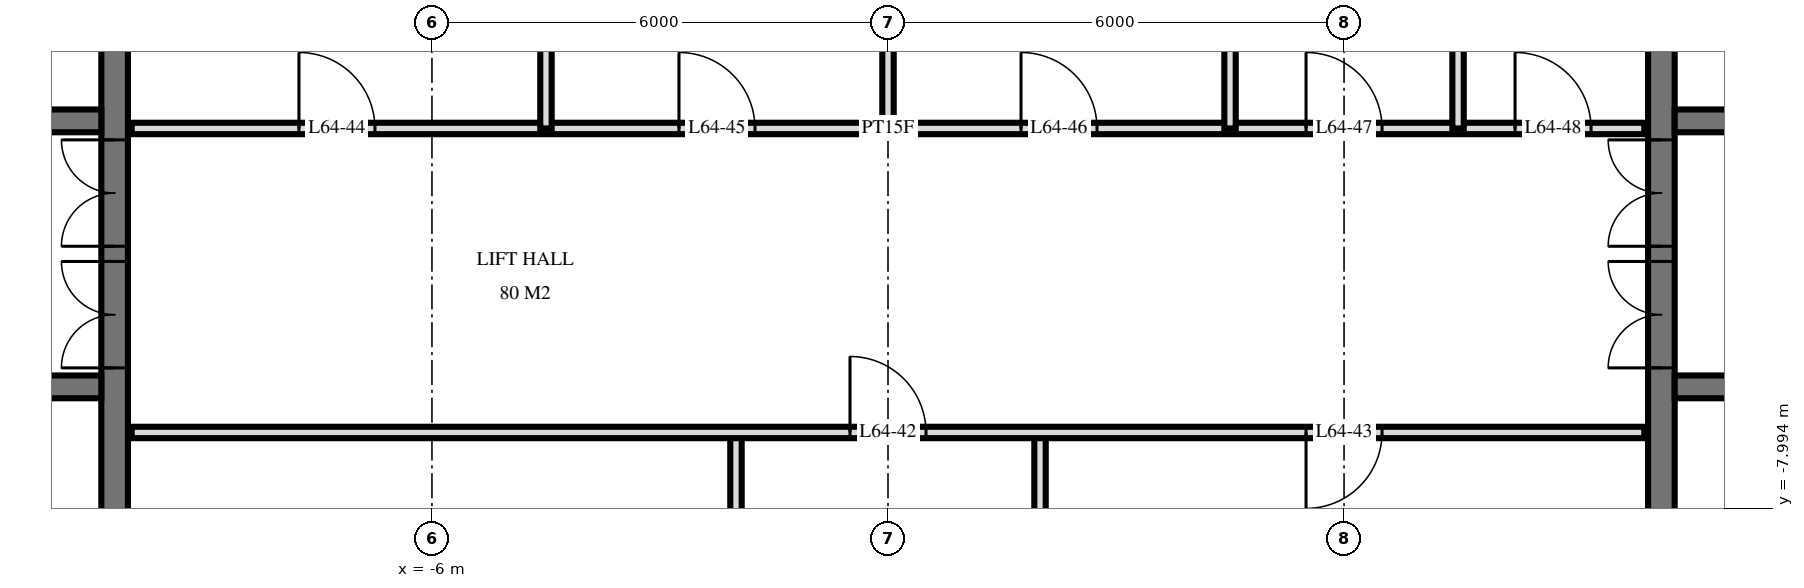
"""IFC4 building model, lengths in metres.
Left out: names, types, materials, properties, quantities, classifications, styles, units other than length and angle.
Written with IfcOpenShell. Run it as: python <this file> out.ifc"""

import sys

from ifc_helpers import new_model, si_unit, direction, frame, frame_2d, origin, place, context, subcontext, project, spatial, rectangle, extrude, element, fill, save


model = new_model("IFC4")
c1 = context("Model", 3, precision=1e-05, world=origin(), true_north=direction((0.0, 1.0)))
c2 = subcontext(c1, "Body", "Model", "MODEL_VIEW")
j1 = project(units=[si_unit("LENGTHUNIT", "METRE"), si_unit("PLANEANGLEUNIT", "RADIAN")], contexts=[c1])
p1 = place(None, origin())
s1 = spatial("IfcSite", under=j1, at=p1, CompositionType="ELEMENT")
p2 = place(p1, origin())
s2 = spatial("IfcBuilding", under=s1, at=p2, CompositionType="ELEMENT")
p3 = place(p2, frame((0.0, 0.0, 243.1)))
s3 = spatial("IfcBuildingStorey", under=s2, at=p3, CompositionType="ELEMENT", Elevation=243.1)
p4 = place(p3, frame((-10.175, -14.55, 0.0), z_axis=(0.0, 0.0, 1.0), x_axis=(0.0, 1.0, 0.0)))
e1 = element("IfcWall", 1, at=p4, inside=s3, PredefinedType="SHEAR", context=c2, shape_type="SweptSolid", body=[
    extrude(rectangle(XDim=14.1, YDim=0.35, at=frame_2d((7.05, 0.0))), origin(), (0.0, 0.0, 1.0), 3.5),
])
p5 = place(p4, frame((8.4, 0.0, 0.0)))
e2 = element("IfcOpeningElement", 2, at=p5, cuts=e1, PredefinedType="OPENING", context=c2, shape_type="SweptSolid", body=[
    extrude(rectangle(XDim=1.4, YDim=2.4, at=frame_2d((0.7, 1.2))), frame((0.0, 0.185, 0.0), z_axis=(0.0, -1.0, 0.0), x_axis=(1.0, 0.0, 0.0)), (0.0, 0.0, 1.0), 0.37),
])
p6 = place(p4, frame((10.0, 0.0, 0.0)))
e3 = element("IfcOpeningElement", 3, at=p6, cuts=e1, PredefinedType="OPENING", context=c2, shape_type="SweptSolid", body=[
    extrude(rectangle(XDim=1.4, YDim=2.4, at=frame_2d((0.7, 1.2))), frame((0.0, 0.185, 0.0), z_axis=(0.0, -1.0, 0.0), x_axis=(1.0, 0.0, 0.0)), (0.0, 0.0, 1.0), 0.37),
])
p7 = place(p4, frame((4.0, 0.0, 0.0)))
e4 = element("IfcOpeningElement", 4, at=p7, cuts=e1, PredefinedType="OPENING", context=c2, shape_type="SweptSolid", body=[
    extrude(rectangle(XDim=1.2, YDim=2.1, at=frame_2d((0.6, 1.05))), frame((0.0, 0.185, 0.0), z_axis=(0.0, -1.0, 0.0), x_axis=(1.0, 0.0, 0.0)), (0.0, 0.0, 1.0), 0.37),
])
p8 = place(p3, frame((-24.05, -2.9, 0.0), z_axis=(0.0, 0.0, 1.0), x_axis=(1.0, 0.0, 0.0)))
e5 = element("IfcWall", 5, at=p8, inside=s3, PredefinedType="SHEAR", context=c2, shape_type="SweptSolid", body=[
    extrude(rectangle(XDim=13.7, YDim=0.3, at=frame_2d((6.85, 0.0))), origin(), (0.0, 0.0, 1.0), 3.5),
])
p9 = place(p8, frame((0.55, 0.0, 0.0)))
e6 = element("IfcOpeningElement", 6, at=p9, cuts=e5, PredefinedType="OPENING", context=c2, shape_type="SweptSolid", body=[
    extrude(rectangle(XDim=1.1, YDim=2.1, at=frame_2d((0.55, 1.05))), frame((0.0, 0.16, 0.0), z_axis=(0.0, -1.0, 0.0), x_axis=(1.0, 0.0, 0.0)), (0.0, 0.0, 1.0), 0.32),
])
p10 = place(p8, frame((6.613, 0.0, 0.0)))
e7 = element("IfcOpeningElement", 7, at=p10, cuts=e5, PredefinedType="OPENING", context=c2, shape_type="SweptSolid", body=[
    extrude(rectangle(XDim=0.9, YDim=2.1, at=frame_2d((0.45, 1.05))), frame((0.0, 0.16, 0.0), z_axis=(0.0, -1.0, 0.0), x_axis=(1.0, 0.0, 0.0)), (0.0, 0.0, 1.0), 0.32),
])
p11 = place(p8, frame((5.188, 0.0, 0.0)))
e8 = element("IfcOpeningElement", 8, at=p11, cuts=e5, PredefinedType="OPENING", context=c2, shape_type="SweptSolid", body=[
    extrude(rectangle(XDim=0.9, YDim=2.1, at=frame_2d((0.45, 1.05))), frame((0.0, 0.16, 0.0), z_axis=(0.0, -1.0, 0.0), x_axis=(1.0, 0.0, 0.0)), (0.0, 0.0, 1.0), 0.32),
])
p12 = place(p8, frame((3.0, 0.0, 0.0)))
e9 = element("IfcOpeningElement", 9, at=p12, cuts=e5, PredefinedType="OPENING", context=c2, shape_type="SweptSolid", body=[
    extrude(rectangle(XDim=1.0, YDim=2.1, at=frame_2d((0.5, 1.05))), frame((0.0, 0.16, 0.0), z_axis=(0.0, -1.0, 0.0), x_axis=(1.0, 0.0, 0.0)), (0.0, 0.0, 1.0), 0.32),
])
p13 = place(p3, frame((-24.05, -6.4, 0.0), z_axis=(0.0, 0.0, 1.0), x_axis=(1.0, 0.0, 0.0)))
e10 = element("IfcWall", 10, at=p13, inside=s3, PredefinedType="SHEAR", context=c2, shape_type="SweptSolid", body=[
    extrude(rectangle(XDim=13.7, YDim=0.3, at=frame_2d((6.85, 0.0))), origin(), (0.0, 0.0, 1.0), 3.5),
])
p14 = place(p13, frame((0.55, 0.0, 0.0)))
e11 = element("IfcOpeningElement", 11, at=p14, cuts=e10, PredefinedType="OPENING", context=c2, shape_type="SweptSolid", body=[
    extrude(rectangle(XDim=1.1, YDim=2.1, at=frame_2d((0.55, 1.05))), frame((0.0, 0.16, 0.0), z_axis=(0.0, -1.0, 0.0), x_axis=(1.0, 0.0, 0.0)), (0.0, 0.0, 1.0), 0.32),
])
p15 = place(p13, frame((5.8, 0.0, 0.0)))
e12 = element("IfcOpeningElement", 12, at=p15, cuts=e10, PredefinedType="OPENING", context=c2, shape_type="SweptSolid", body=[
    extrude(rectangle(XDim=1.1, YDim=2.1, at=frame_2d((0.55, 1.05))), frame((0.0, 0.16, 0.0), z_axis=(0.0, -1.0, 0.0), x_axis=(1.0, 0.0, 0.0)), (0.0, 0.0, 1.0), 0.32),
])
p16 = place(p3, frame((10.175, -14.55, 0.0), z_axis=(0.0, 0.0, 1.0), x_axis=(0.0, 1.0, 0.0)))
e13 = element("IfcWall", 13, at=p16, inside=s3, PredefinedType="SHEAR", context=c2, shape_type="SweptSolid", body=[
    extrude(rectangle(XDim=14.1, YDim=0.35, at=frame_2d((7.05, 0.0))), origin(), (0.0, 0.0, 1.0), 3.5),
])
p17 = place(p16, frame((8.4, 0.0, 0.0)))
e14 = element("IfcOpeningElement", 14, at=p17, cuts=e13, PredefinedType="OPENING", context=c2, shape_type="SweptSolid", body=[
    extrude(rectangle(XDim=1.4, YDim=2.4, at=frame_2d((0.7, 1.2))), frame((0.0, 0.185, 0.0), z_axis=(0.0, -1.0, 0.0), x_axis=(1.0, 0.0, 0.0)), (0.0, 0.0, 1.0), 0.37),
])
p18 = place(p16, frame((10.0, 0.0, 0.0)))
e15 = element("IfcOpeningElement", 15, at=p18, cuts=e13, PredefinedType="OPENING", context=c2, shape_type="SweptSolid", body=[
    extrude(rectangle(XDim=1.4, YDim=2.4, at=frame_2d((0.7, 1.2))), frame((0.0, 0.185, 0.0), z_axis=(0.0, -1.0, 0.0), x_axis=(1.0, 0.0, 0.0)), (0.0, 0.0, 1.0), 0.37),
])
p19 = place(p16, frame((4.0, 0.0, 0.0)))
e16 = element("IfcOpeningElement", 16, at=p19, cuts=e13, PredefinedType="OPENING", context=c2, shape_type="SweptSolid", body=[
    extrude(rectangle(XDim=1.2, YDim=2.1, at=frame_2d((0.6, 1.05))), frame((0.0, 0.185, 0.0), z_axis=(0.0, -1.0, 0.0), x_axis=(1.0, 0.0, 0.0)), (0.0, 0.0, 1.0), 0.37),
])
p20 = place(p3, frame((10.35, -2.9, 0.0), z_axis=(0.0, 0.0, 1.0), x_axis=(1.0, 0.0, 0.0)))
e17 = element("IfcWall", 17, at=p20, inside=s3, PredefinedType="SHEAR", context=c2, shape_type="SweptSolid", body=[
    extrude(rectangle(XDim=13.7, YDim=0.3, at=frame_2d((6.85, 0.0))), origin(), (0.0, 0.0, 1.0), 3.5),
])
p21 = place(p20, frame((12.05, 0.0, 0.0)))
e18 = element("IfcOpeningElement", 18, at=p21, cuts=e17, PredefinedType="OPENING", context=c2, shape_type="SweptSolid", body=[
    extrude(rectangle(XDim=1.1, YDim=2.1, at=frame_2d((0.55, 1.05))), frame((0.0, 0.16, 0.0), z_axis=(0.0, -1.0, 0.0), x_axis=(1.0, 0.0, 0.0)), (0.0, 0.0, 1.0), 0.32),
])
p22 = place(p20, frame((6.188, 0.0, 0.0)))
e19 = element("IfcOpeningElement", 19, at=p22, cuts=e17, PredefinedType="OPENING", context=c2, shape_type="SweptSolid", body=[
    extrude(rectangle(XDim=0.9, YDim=2.1, at=frame_2d((0.45, 1.05))), frame((0.0, 0.16, 0.0), z_axis=(0.0, -1.0, 0.0), x_axis=(1.0, 0.0, 0.0)), (0.0, 0.0, 1.0), 0.32),
])
p23 = place(p20, frame((7.613, 0.0, 0.0)))
e20 = element("IfcOpeningElement", 20, at=p23, cuts=e17, PredefinedType="OPENING", context=c2, shape_type="SweptSolid", body=[
    extrude(rectangle(XDim=0.9, YDim=2.1, at=frame_2d((0.45, 1.05))), frame((0.0, 0.16, 0.0), z_axis=(0.0, -1.0, 0.0), x_axis=(1.0, 0.0, 0.0)), (0.0, 0.0, 1.0), 0.32),
])
p24 = place(p20, frame((9.7, 0.0, 0.0)))
e21 = element("IfcOpeningElement", 21, at=p24, cuts=e17, PredefinedType="OPENING", context=c2, shape_type="SweptSolid", body=[
    extrude(rectangle(XDim=1.0, YDim=2.1, at=frame_2d((0.5, 1.05))), frame((0.0, 0.16, 0.0), z_axis=(0.0, -1.0, 0.0), x_axis=(1.0, 0.0, 0.0)), (0.0, 0.0, 1.0), 0.32),
])
p25 = place(p3, frame((10.35, -6.4, 0.0), z_axis=(0.0, 0.0, 1.0), x_axis=(1.0, 0.0, 0.0)))
e22 = element("IfcWall", 22, at=p25, inside=s3, PredefinedType="SHEAR", context=c2, shape_type="SweptSolid", body=[
    extrude(rectangle(XDim=13.7, YDim=0.3, at=frame_2d((6.85, 0.0))), origin(), (0.0, 0.0, 1.0), 3.5),
])
p26 = place(p25, frame((12.05, 0.0, 0.0)))
e23 = element("IfcOpeningElement", 23, at=p26, cuts=e22, PredefinedType="OPENING", context=c2, shape_type="SweptSolid", body=[
    extrude(rectangle(XDim=1.1, YDim=2.1, at=frame_2d((0.55, 1.05))), frame((0.0, 0.16, 0.0), z_axis=(0.0, -1.0, 0.0), x_axis=(1.0, 0.0, 0.0)), (0.0, 0.0, 1.0), 0.32),
])
p27 = place(p25, frame((6.8, 0.0, 0.0)))
e24 = element("IfcOpeningElement", 24, at=p27, cuts=e22, PredefinedType="OPENING", context=c2, shape_type="SweptSolid", body=[
    extrude(rectangle(XDim=1.1, YDim=2.1, at=frame_2d((0.55, 1.05))), frame((0.0, 0.16, 0.0), z_axis=(0.0, -1.0, 0.0), x_axis=(1.0, 0.0, 0.0)), (0.0, 0.0, 1.0), 0.32),
])
for number, where, z_axis, x_axis in (
    (25, (7.5, -3.0, 0.0), (0.0, 0.0, 1.0), (0.0, 1.0, 0.0)),
    (26, (4.5, -3.0, 0.0), (0.0, 0.0, 1.0), (0.0, 1.0, 0.0)),
):
    element("IfcWall", number, at=place(p3, frame(where, z_axis=z_axis, x_axis=x_axis)), inside=s3, PredefinedType="PLUMBINGWALL", context=c2, shape_type="SweptSolid", body=[
        extrude(rectangle(XDim=4.02, YDim=0.15, at=frame_2d((2.01, 0.0))), origin(), (0.0, 0.0, 1.0), 3.22),
    ])
p28 = place(p3, frame((2.0, -11.0, 0.0), z_axis=(0.0, 0.0, 1.0), x_axis=(0.0, 1.0, 0.0)))
e27 = element("IfcWall", 27, at=p28, inside=s3, PredefinedType="PARTITIONING", context=c2, shape_type="SweptSolid", body=[
    extrude(rectangle(XDim=4.0, YDim=0.15, at=frame_2d((2.0, 0.0))), origin(), (0.0, 0.0, 1.0), 3.22),
])
p29 = place(p3, frame((0.0, -3.0, 0.0), z_axis=(0.0, 0.0, 1.0), x_axis=(0.0, 1.0, 0.0)))
e28 = element("IfcWall", 28, at=p29, inside=s3, PredefinedType="PARTITIONING", context=c2, shape_type="SweptSolid", body=[
    extrude(rectangle(XDim=4.02, YDim=0.15, at=frame_2d((2.01, 0.0))), origin(), (0.0, 0.0, 1.0), 3.22),
])
p30 = place(p3, frame((-2.0, -11.0, 0.0), z_axis=(0.0, 0.0, 1.0), x_axis=(0.0, 1.0, 0.0)))
e29 = element("IfcWall", 29, at=p30, inside=s3, PredefinedType="PARTITIONING", context=c2, shape_type="SweptSolid", body=[
    extrude(rectangle(XDim=4.0, YDim=0.15, at=frame_2d((2.0, 0.0))), origin(), (0.0, 0.0, 1.0), 3.22),
])
p31 = place(p3, frame((-4.5, -3.0, 0.0), z_axis=(0.0, 0.0, 1.0), x_axis=(0.0, 1.0, 0.0)))
e30 = element("IfcWall", 30, at=p31, inside=s3, PredefinedType="PARTITIONING", context=c2, shape_type="SweptSolid", body=[
    extrude(rectangle(XDim=4.02, YDim=0.15, at=frame_2d((2.01, 0.0))), origin(), (0.0, 0.0, 1.0), 3.22),
])
p32 = place(p3, frame((-9.95, -7.0, 0.0), z_axis=(0.0, 0.0, 1.0), x_axis=(1.0, 0.0, 0.0)))
e31 = element("IfcWall", 31, at=p32, inside=s3, PredefinedType="PARTITIONING", context=c2, shape_type="SweptSolid", body=[
    extrude(rectangle(XDim=19.9, YDim=0.15, at=frame_2d((9.95, 0.0))), origin(), (0.0, 0.0, 1.0), 3.22),
])
p33 = place(p32, frame((9.45, 0.0, 0.0)))
e32 = element("IfcOpeningElement", 32, at=p33, cuts=e31, PredefinedType="OPENING", context=c2, shape_type="SweptSolid", body=[
    extrude(rectangle(XDim=1.0, YDim=2.1, at=frame_2d((0.5, 1.05))), frame((0.0, 0.085, 0.0), z_axis=(0.0, -1.0, 0.0), x_axis=(1.0, 0.0, 0.0)), (0.0, 0.0, 1.0), 0.17),
])
p34 = place(p32, frame((15.45, 0.0, 0.0)))
e33 = element("IfcOpeningElement", 33, at=p34, cuts=e31, PredefinedType="OPENING", context=c2, shape_type="SweptSolid", body=[
    extrude(rectangle(XDim=1.0, YDim=2.1, at=frame_2d((0.5, 1.05))), frame((0.0, 0.085, 0.0), z_axis=(0.0, -1.0, 0.0), x_axis=(1.0, 0.0, 0.0)), (0.0, 0.0, 1.0), 0.17),
])
p35 = place(p3, frame((-9.95, -3.0, 0.0), z_axis=(0.0, 0.0, 1.0), x_axis=(1.0, 0.0, 0.0)))
e34 = element("IfcWall", 34, at=p35, inside=s3, PredefinedType="PARTITIONING", context=c2, shape_type="SweptSolid", body=[
    extrude(rectangle(XDim=19.9, YDim=0.15, at=frame_2d((9.95, 0.0))), origin(), (0.0, 0.0, 1.0), 3.22),
])
p36 = place(p35, frame((2.2, 0.0, 0.0)))
e35 = element("IfcOpeningElement", 35, at=p36, cuts=e34, PredefinedType="OPENING", context=c2, shape_type="SweptSolid", body=[
    extrude(rectangle(XDim=1.0, YDim=2.1, at=frame_2d((0.5, 1.05))), frame((0.0, 0.085, 0.0), z_axis=(0.0, -1.0, 0.0), x_axis=(1.0, 0.0, 0.0)), (0.0, 0.0, 1.0), 0.17),
])
p37 = place(p35, frame((7.2, 0.0, 0.0)))
e36 = element("IfcOpeningElement", 36, at=p37, cuts=e34, PredefinedType="OPENING", context=c2, shape_type="SweptSolid", body=[
    extrude(rectangle(XDim=1.0, YDim=2.1, at=frame_2d((0.5, 1.05))), frame((0.0, 0.085, 0.0), z_axis=(0.0, -1.0, 0.0), x_axis=(1.0, 0.0, 0.0)), (0.0, 0.0, 1.0), 0.17),
])
p38 = place(p35, frame((11.7, 0.0, 0.0)))
e37 = element("IfcOpeningElement", 37, at=p38, cuts=e34, PredefinedType="OPENING", context=c2, shape_type="SweptSolid", body=[
    extrude(rectangle(XDim=1.0, YDim=2.1, at=frame_2d((0.5, 1.05))), frame((0.0, 0.085, 0.0), z_axis=(0.0, -1.0, 0.0), x_axis=(1.0, 0.0, 0.0)), (0.0, 0.0, 1.0), 0.17),
])
p39 = place(p35, frame((15.45, 0.0, 0.0)))
e38 = element("IfcOpeningElement", 38, at=p39, cuts=e34, PredefinedType="OPENING", context=c2, shape_type="SweptSolid", body=[
    extrude(rectangle(XDim=1.0, YDim=2.1, at=frame_2d((0.5, 1.05))), frame((0.0, 0.085, 0.0), z_axis=(0.0, -1.0, 0.0), x_axis=(1.0, 0.0, 0.0)), (0.0, 0.0, 1.0), 0.17),
])
p40 = place(p35, frame((18.2, 0.0, 0.0)))
e39 = element("IfcOpeningElement", 39, at=p40, cuts=e34, PredefinedType="OPENING", context=c2, shape_type="SweptSolid", body=[
    extrude(rectangle(XDim=1.0, YDim=2.1, at=frame_2d((0.5, 1.05))), frame((0.0, 0.085, 0.0), z_axis=(0.0, -1.0, 0.0), x_axis=(1.0, 0.0, 0.0)), (0.0, 0.0, 1.0), 0.17),
])
p41 = place(p5, origin())
e40 = element("IfcDoor", 40, at=p41, inside=s3, OperationType="DOUBLE_DOOR_SINGLE_SWING", PredefinedType="DOOR", context=c2, shape_type="SweptSolid", body=[
    extrude(rectangle(XDim=1.4, YDim=2.4, at=frame_2d((0.7, 1.2))), frame((0.0, 0.025, 0.0), z_axis=(0.0, -1.0, 0.0), x_axis=(1.0, 0.0, 0.0)), (0.0, 0.0, 1.0), 0.05),
])
fill(e2, e40)
p42 = place(p6, origin())
e41 = element("IfcDoor", 41, at=p42, inside=s3, OperationType="DOUBLE_DOOR_SINGLE_SWING", PredefinedType="DOOR", context=c2, shape_type="SweptSolid", body=[
    extrude(rectangle(XDim=1.4, YDim=2.4, at=frame_2d((0.7, 1.2))), frame((0.0, 0.025, 0.0), z_axis=(0.0, -1.0, 0.0), x_axis=(1.0, 0.0, 0.0)), (0.0, 0.0, 1.0), 0.05),
])
fill(e3, e41)
p43 = place(p17, origin())
e42 = element("IfcDoor", 42, at=p43, inside=s3, OperationType="DOUBLE_DOOR_SINGLE_SWING", PredefinedType="DOOR", context=c2, shape_type="SweptSolid", body=[
    extrude(rectangle(XDim=1.4, YDim=2.4, at=frame_2d((0.7, 1.2))), frame((0.0, 0.025, 0.0), z_axis=(0.0, -1.0, 0.0), x_axis=(1.0, 0.0, 0.0)), (0.0, 0.0, 1.0), 0.05),
])
fill(e14, e42)
p44 = place(p18, origin())
e43 = element("IfcDoor", 43, at=p44, inside=s3, OperationType="DOUBLE_DOOR_SINGLE_SWING", PredefinedType="DOOR", context=c2, shape_type="SweptSolid", body=[
    extrude(rectangle(XDim=1.4, YDim=2.4, at=frame_2d((0.7, 1.2))), frame((0.0, 0.025, 0.0), z_axis=(0.0, -1.0, 0.0), x_axis=(1.0, 0.0, 0.0)), (0.0, 0.0, 1.0), 0.05),
])
fill(e15, e43)
p45 = place(p33, origin())
e44 = element("IfcDoor", 44, at=p45, inside=s3, OperationType="SINGLE_SWING_RIGHT", PredefinedType="DOOR", context=c2, shape_type="SweptSolid", body=[
    extrude(rectangle(XDim=1.0, YDim=2.1, at=frame_2d((0.5, 1.05))), frame((0.0, 0.025, 0.0), z_axis=(0.0, -1.0, 0.0), x_axis=(1.0, 0.0, 0.0)), (0.0, 0.0, 1.0), 0.05),
])
fill(e32, e44)
p46 = place(p34, frame((0.5, 0.0, 0.0), z_axis=(0.0, 0.0, 1.0), x_axis=(-1.0, 0.0, 0.0)))
e45 = element("IfcDoor", 45, at=p46, inside=s3, OperationType="SINGLE_SWING_LEFT", PredefinedType="DOOR", context=c2, shape_type="SweptSolid", body=[
    extrude(rectangle(XDim=1.0, YDim=2.1, at=frame_2d((0.0, 1.05))), frame((0.0, -0.025, 0.0), z_axis=(0.0, 1.0, 0.0), x_axis=(-1.0, 0.0, 0.0)), (0.0, 0.0, 1.0), 0.05),
])
fill(e33, e45)
p47 = place(p36, origin())
e46 = element("IfcDoor", 46, at=p47, inside=s3, OperationType="SINGLE_SWING_RIGHT", PredefinedType="DOOR", context=c2, shape_type="SweptSolid", body=[
    extrude(rectangle(XDim=1.0, YDim=2.1, at=frame_2d((0.5, 1.05))), frame((0.0, 0.025, 0.0), z_axis=(0.0, -1.0, 0.0), x_axis=(1.0, 0.0, 0.0)), (0.0, 0.0, 1.0), 0.05),
])
fill(e35, e46)
p48 = place(p37, origin())
e47 = element("IfcDoor", 47, at=p48, inside=s3, OperationType="SINGLE_SWING_RIGHT", PredefinedType="DOOR", context=c2, shape_type="SweptSolid", body=[
    extrude(rectangle(XDim=1.0, YDim=2.1, at=frame_2d((0.5, 1.05))), frame((0.0, 0.025, 0.0), z_axis=(0.0, -1.0, 0.0), x_axis=(1.0, 0.0, 0.0)), (0.0, 0.0, 1.0), 0.05),
])
fill(e36, e47)
p49 = place(p38, origin())
e48 = element("IfcDoor", 48, at=p49, inside=s3, OperationType="SINGLE_SWING_RIGHT", PredefinedType="DOOR", context=c2, shape_type="SweptSolid", body=[
    extrude(rectangle(XDim=1.0, YDim=2.1, at=frame_2d((0.5, 1.05))), frame((0.0, 0.025, 0.0), z_axis=(0.0, -1.0, 0.0), x_axis=(1.0, 0.0, 0.0)), (0.0, 0.0, 1.0), 0.05),
])
fill(e37, e48)
p50 = place(p39, origin())
e49 = element("IfcDoor", 49, at=p50, inside=s3, OperationType="SINGLE_SWING_RIGHT", PredefinedType="DOOR", context=c2, shape_type="SweptSolid", body=[
    extrude(rectangle(XDim=1.0, YDim=2.1, at=frame_2d((0.5, 1.05))), frame((0.0, 0.025, 0.0), z_axis=(0.0, -1.0, 0.0), x_axis=(1.0, 0.0, 0.0)), (0.0, 0.0, 1.0), 0.05),
])
fill(e38, e49)
p51 = place(p40, origin())
e50 = element("IfcDoor", 50, at=p51, inside=s3, OperationType="SINGLE_SWING_RIGHT", PredefinedType="DOOR", context=c2, shape_type="SweptSolid", body=[
    extrude(rectangle(XDim=1.0, YDim=2.1, at=frame_2d((0.5, 1.05))), frame((0.0, 0.025, 0.0), z_axis=(0.0, -1.0, 0.0), x_axis=(1.0, 0.0, 0.0)), (0.0, 0.0, 1.0), 0.05),
])
fill(e39, e50)
save(model, sys.argv[1])
